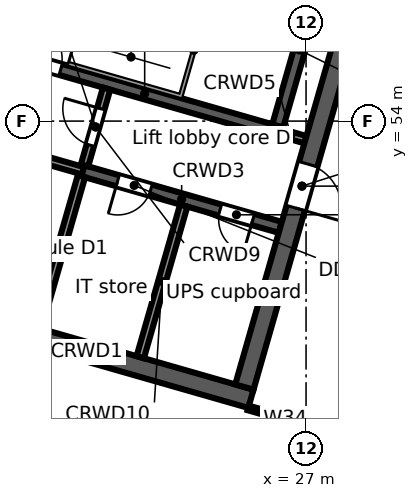
"""IFC4 building model, lengths in metres.
Left out: names, types, materials, properties, quantities, classifications, styles, units other than length and angle.
Written with IfcOpenShell. Run it as: python <this file> out.ifc"""

import sys

from ifc_helpers import new_model, si_unit, direction, frame, frame_2d, origin, place, context, subcontext, project, spatial, rectangle, extrude, element, fill, save


model = new_model("IFC4")
c1 = context("Model", 3, precision=1e-05, world=origin(), true_north=direction((0.0, 1.0)))
c2 = subcontext(c1, "Body", "Model", "MODEL_VIEW")
j1 = project(units=[si_unit("LENGTHUNIT", "METRE"), si_unit("PLANEANGLEUNIT", "RADIAN")], contexts=[c1])
p1 = place(None, origin())
s1 = spatial("IfcSite", under=j1, at=p1, CompositionType="ELEMENT")
p2 = place(p1, origin())
s2 = spatial("IfcBuilding", under=s1, at=p2, CompositionType="ELEMENT")
p3 = place(p2, frame((0.0, 0.0, 178.9)))
s3 = spatial("IfcBuildingStorey", under=s2, at=p3, CompositionType="ELEMENT", Elevation=178.9)
p4 = place(p3, frame((24.042, 41.106, 0.0), z_axis=(0.0, 0.0, 1.0), x_axis=(-0.961261693976, 0.275637362661, 0.0)))
e1 = element("IfcWall", 1, at=p4, inside=s3, PredefinedType="STANDARD", context=c2, shape_type="SweptSolid", body=[
    extrude(rectangle(XDim=24.948, YDim=0.3, at=frame_2d((12.474, 0.0))), origin(), (0.0, 0.0, 1.0), 3.68),
])
p5 = place(p4, frame((21.441, 0.0, 0.6)))
e2 = element("IfcOpeningElement", 2, at=p5, cuts=e1, PredefinedType="OPENING", context=c2, shape_type="SweptSolid", body=[
    extrude(rectangle(XDim=0.9, YDim=2.4, at=frame_2d((0.45, 1.2))), frame((0.0, 0.16, 0.0), z_axis=(0.0, -1.0, 0.0), x_axis=(1.0, 0.0, 0.0)), (0.0, 0.0, 1.0), 0.32),
])
p6 = place(p4, frame((13.121, 0.0, 0.6)))
e3 = element("IfcOpeningElement", 3, at=p6, cuts=e1, PredefinedType="OPENING", context=c2, shape_type="SweptSolid", body=[
    extrude(rectangle(XDim=0.9, YDim=2.4, at=frame_2d((0.45, 1.2))), frame((0.0, 0.16, 0.0), z_axis=(0.0, -1.0, 0.0), x_axis=(1.0, 0.0, 0.0)), (0.0, 0.0, 1.0), 0.32),
])
p7 = place(p4, frame((10.591, 0.0, 0.0)))
e4 = element("IfcOpeningElement", 4, at=p7, cuts=e1, PredefinedType="OPENING", context=c2, shape_type="SweptSolid", body=[
    extrude(rectangle(XDim=1.8, YDim=2.4, at=frame_2d((0.9, 1.2))), frame((0.0, 0.16, 0.0), z_axis=(0.0, -1.0, 0.0), x_axis=(1.0, 0.0, 0.0)), (0.0, 0.0, 1.0), 0.32),
])
p8 = place(p4, frame((4.8, 0.0, 0.6)))
e5 = element("IfcOpeningElement", 5, at=p8, cuts=e1, PredefinedType="OPENING", context=c2, shape_type="SweptSolid", body=[
    extrude(rectangle(XDim=0.9, YDim=2.4, at=frame_2d((0.45, 1.2))), frame((0.0, 0.16, 0.0), z_axis=(0.0, -1.0, 0.0), x_axis=(1.0, 0.0, 0.0)), (0.0, 0.0, 1.0), 0.32),
])
p9 = place(p4, frame((2.27, 0.0, 0.0)))
e6 = element("IfcOpeningElement", 6, at=p9, cuts=e1, PredefinedType="OPENING", context=c2, shape_type="SweptSolid", body=[
    extrude(rectangle(XDim=1.8, YDim=2.4, at=frame_2d((0.9, 1.2))), frame((0.0, 0.16, 0.0), z_axis=(0.0, -1.0, 0.0), x_axis=(1.0, 0.0, 0.0)), (0.0, 0.0, 1.0), 0.32),
])
p10 = place(p3, frame((37.399, 59.851, 0.0), z_axis=(0.0, 0.0, 1.0), x_axis=(-0.529919986982, -0.848047644532, 0.0)))
e7 = element("IfcWall", 7, at=p10, inside=s3, PredefinedType="STANDARD", context=c2, shape_type="SweptSolid", body=[
    extrude(rectangle(XDim=21.125, YDim=0.3, at=frame_2d((10.562, 0.0))), origin(), (0.0, 0.0, 1.0), 3.68),
])
p11 = place(p10, frame((16.687, 0.0, 0.6)))
e8 = element("IfcOpeningElement", 8, at=p11, cuts=e7, PredefinedType="OPENING", context=c2, shape_type="SweptSolid", body=[
    extrude(rectangle(XDim=0.9, YDim=2.4, at=frame_2d((0.45, 1.2))), frame((0.0, 0.16, 0.0), z_axis=(0.0, -1.0, 0.0), x_axis=(1.0, 0.0, 0.0)), (0.0, 0.0, 1.0), 0.32),
])
p12 = place(p10, frame((6.187, 0.0, 0.6)))
e9 = element("IfcOpeningElement", 9, at=p12, cuts=e7, PredefinedType="OPENING", context=c2, shape_type="SweptSolid", body=[
    extrude(rectangle(XDim=0.9, YDim=2.4, at=frame_2d((0.45, 1.2))), frame((0.0, 0.16, 0.0), z_axis=(0.0, -1.0, 0.0), x_axis=(1.0, 0.0, 0.0)), (0.0, 0.0, 1.0), 0.32),
])
p13 = place(p3, frame((16.897, 49.173, 0.0), z_axis=(0.0, 0.0, 1.0), x_axis=(0.96126248289, -0.275634611374, 0.0)))
e10 = element("IfcWall", 10, at=p13, inside=s3, PredefinedType="SOLIDWALL", context=c2, shape_type="SweptSolid", body=[
    extrude(rectangle(XDim=9.0, YDim=0.5, at=frame_2d((4.5, 0.0))), origin(), (0.0, 0.0, 1.0), 3.68),
])
p14 = place(p3, frame((18.632, 53.409, 0.0), z_axis=(0.0, 0.0, 1.0), x_axis=(0.961247078216, -0.275688328772, 0.0)))
e11 = element("IfcWall", 11, at=p14, inside=s3, PredefinedType="SOLIDWALL", context=c2, shape_type="SweptSolid", body=[
    extrude(rectangle(XDim=2.6, YDim=0.2, at=frame_2d((1.3, 0.0))), origin(), (0.0, 0.0, 1.0), 3.68),
])
p15 = place(p3, frame((21.131, 52.692, 0.0), z_axis=(0.0, 0.0, 1.0), x_axis=(0.961271043721, -0.27560475414, 0.0)))
e12 = element("IfcWall", 12, at=p15, inside=s3, PredefinedType="SOLIDWALL", context=c2, shape_type="SweptSolid", body=[
    extrude(rectangle(XDim=5.4, YDim=0.3, at=frame_2d((2.7, 0.0))), origin(), (0.0, 0.0, 1.0), 3.68),
])
p16 = place(p15, frame((0.95, 0.0, 0.0)))
e13 = element("IfcOpeningElement", 13, at=p16, cuts=e12, PredefinedType="OPENING", context=c2, shape_type="SweptSolid", body=[
    extrude(rectangle(XDim=0.9, YDim=2.1, at=frame_2d((0.45, 1.05))), frame((0.0, 0.16, 0.0), z_axis=(0.0, -1.0, 0.0), x_axis=(1.0, 0.0, 0.0)), (0.0, 0.0, 1.0), 0.32),
])
p17 = place(p15, frame((3.75, 0.0, 0.0)))
e14 = element("IfcOpeningElement", 14, at=p17, cuts=e12, PredefinedType="OPENING", context=c2, shape_type="SweptSolid", body=[
    extrude(rectangle(XDim=0.9, YDim=2.1, at=frame_2d((0.45, 1.05))), frame((0.0, 0.16, 0.0), z_axis=(0.0, -1.0, 0.0), x_axis=(1.0, 0.0, 0.0)), (0.0, 0.0, 1.0), 0.32),
])
p18 = place(p3, frame((19.293, 55.716, 0.0), z_axis=(0.0, 0.0, 1.0), x_axis=(0.96125862491, -0.275648065539, 0.0)))
e15 = element("IfcWall", 15, at=p18, inside=s3, PredefinedType="SOLIDWALL", context=c2, shape_type="SweptSolid", body=[
    extrude(rectangle(XDim=7.2, YDim=0.3, at=frame_2d((3.6, 0.0))), origin(), (0.0, 0.0, 1.0), 3.68),
])
p19 = place(p18, frame((0.3, 0.0, 0.0)))
e16 = element("IfcOpeningElement", 16, at=p19, cuts=e15, PredefinedType="OPENING", context=c2, shape_type="SweptSolid", body=[
    extrude(rectangle(XDim=1.0, YDim=2.1, at=frame_2d((0.5, 1.05))), frame((0.0, 0.16, 0.0), z_axis=(0.0, -1.0, 0.0), x_axis=(1.0, 0.0, 0.0)), (0.0, 0.0, 1.0), 0.32),
])
p20 = place(p3, frame((26.214, 53.732, 0.0), z_axis=(0.0, 0.0, 1.0), x_axis=(0.961200870072, -0.275849392554, 0.0)))
e17 = element("IfcWall", 17, at=p20, inside=s3, PredefinedType="SOLIDWALL", context=c2, shape_type="SweptSolid", body=[
    extrude(rectangle(XDim=0.8, YDim=0.2, at=frame_2d((0.4, 0.0))), origin(), (0.0, 0.0, 1.0), 3.68),
])
p21 = place(p3, frame((17.206, 49.344, 0.0), z_axis=(0.0, 0.0, 1.0), x_axis=(0.275632651182, 0.961263044958, 0.0)))
e18 = element("IfcWall", 18, at=p21, inside=s3, PredefinedType="SOLIDWALL", context=c2, shape_type="SweptSolid", body=[
    extrude(rectangle(XDim=11.0, YDim=0.5, at=frame_2d((5.5, 0.0))), origin(), (0.0, 0.0, 1.0), 3.68),
])
p22 = place(p21, frame((4.9, 0.0, 0.0)))
e19 = element("IfcOpeningElement", 19, at=p22, cuts=e18, PredefinedType="OPENING", context=c2, shape_type="SweptSolid", body=[
    extrude(rectangle(XDim=1.2, YDim=2.1, at=frame_2d((0.6, 1.05))), frame((0.0, 0.26, 0.0), z_axis=(0.0, -1.0, 0.0), x_axis=(1.0, 0.0, 0.0)), (0.0, 0.0, 1.0), 0.52),
])
p23 = place(p3, frame((19.946, 48.559, 0.0), z_axis=(0.0, 0.0, 1.0), x_axis=(0.275668905258, 0.961252648721, 0.0)))
e20 = element("IfcWall", 20, at=p23, inside=s3, PredefinedType="SOLIDWALL", context=c2, shape_type="SweptSolid", body=[
    extrude(rectangle(XDim=4.15, YDim=0.2, at=frame_2d((2.075, 0.0))), origin(), (0.0, 0.0, 1.0), 3.68),
])
p24 = place(p3, frame((21.172, 52.837, 0.0), z_axis=(0.0, 0.0, 1.0), x_axis=(0.275657676022, 0.961255868981, 0.0)))
e21 = element("IfcWall", 21, at=p24, inside=s3, PredefinedType="PARTITIONING", context=c2, shape_type="SweptSolid", body=[
    extrude(rectangle(XDim=2.1, YDim=0.2, at=frame_2d((1.05, 0.0))), origin(), (0.0, 0.0, 1.0), 3.68),
])
p25 = place(p24, frame((0.55, 0.0, 0.0)))
e22 = element("IfcOpeningElement", 22, at=p25, cuts=e21, PredefinedType="OPENING", context=c2, shape_type="SweptSolid", body=[
    extrude(rectangle(XDim=1.0, YDim=2.1, at=frame_2d((0.5, 1.05))), frame((0.0, 0.11, 0.0), z_axis=(0.0, -1.0, 0.0), x_axis=(1.0, 0.0, 0.0)), (0.0, 0.0, 1.0), 0.22),
])
p26 = place(p3, frame((22.637, 47.787, 0.0), z_axis=(0.0, 0.0, 1.0), x_axis=(0.275614546295, 0.961268236171, 0.0)))
e23 = element("IfcWall", 23, at=p26, inside=s3, PredefinedType="PARTITIONING", context=c2, shape_type="SweptSolid", body=[
    extrude(rectangle(XDim=4.15, YDim=0.2, at=frame_2d((2.075, 0.0))), origin(), (0.0, 0.0, 1.0), 3.68),
])
p27 = place(p3, frame((26.256, 53.876, 0.0), z_axis=(0.0, 0.0, 1.0), x_axis=(0.275614546295, 0.961268236171, 0.0)))
e24 = element("IfcWall", 24, at=p27, inside=s3, PredefinedType="SOLIDWALL", context=c2, shape_type="SweptSolid", body=[
    extrude(rectangle(XDim=4.15, YDim=0.3, at=frame_2d((2.075, 0.0))), origin(), (0.0, 0.0, 1.0), 3.68),
])
p28 = place(p3, frame((25.377, 47.002, 0.0), z_axis=(0.0, 0.0, 1.0), x_axis=(0.275632651182, 0.961263044958, 0.0)))
e25 = element("IfcWall", 25, at=p28, inside=s3, PredefinedType="SOLIDWALL", context=c2, shape_type="SweptSolid", body=[
    extrude(rectangle(XDim=11.0, YDim=0.5, at=frame_2d((5.5, 0.0))), origin(), (0.0, 0.0, 1.0), 3.68),
])
p29 = place(p28, frame((4.9, 0.0, 0.0)))
e26 = element("IfcOpeningElement", 26, at=p29, cuts=e25, PredefinedType="OPENING", context=c2, shape_type="SweptSolid", body=[
    extrude(rectangle(XDim=1.2, YDim=2.1, at=frame_2d((0.6, 1.05))), frame((0.0, 0.26, 0.0), z_axis=(0.0, -1.0, 0.0), x_axis=(1.0, 0.0, 0.0)), (0.0, 0.0, 1.0), 0.52),
])
p30 = place(p3, frame((25.479, 46.452, 0.0), z_axis=(0.0, 0.0, 1.0), x_axis=(0.961245725795, -0.275693044238, 0.0)))
e27 = element("IfcWall", 27, at=p30, inside=s3, PredefinedType="PARTITIONING", context=c2, shape_type="SweptSolid", body=[
    extrude(rectangle(XDim=2.023, YDim=0.125, at=frame_2d((1.012, 0.0))), origin(), (0.0, 0.0, 1.0), 2.952),
])
p31 = place(p19, origin())
e28 = element("IfcDoor", 28, at=p31, inside=s3, OperationType="SINGLE_SWING_LEFT", PredefinedType="DOOR", context=c2, shape_type="SweptSolid", body=[
    extrude(rectangle(XDim=1.0, YDim=2.1, at=frame_2d((0.5, 1.05))), frame((0.0, 0.025, 0.0), z_axis=(0.0, -1.0, 0.0), x_axis=(1.0, 0.0, 0.0)), (0.0, 0.0, 1.0), 0.05),
])
fill(e16, e28)
p32 = place(p25, origin())
e29 = element("IfcDoor", 29, at=p32, inside=s3, OperationType="SINGLE_SWING_RIGHT", PredefinedType="DOOR", context=c2, shape_type="SweptSolid", body=[
    extrude(rectangle(XDim=1.0, YDim=2.1, at=frame_2d((0.5, 1.05))), frame((0.0, 0.025, 0.0), z_axis=(0.0, -1.0, 0.0), x_axis=(1.0, 0.0, 0.0)), (0.0, 0.0, 1.0), 0.05),
])
fill(e22, e29)
p33 = place(p29, frame((1.2, 0.0, 0.0), z_axis=(0.0, 0.0, 1.0), x_axis=(-1.0, 0.0, 0.0)))
e30 = element("IfcDoor", 30, at=p33, inside=s3, OperationType="SINGLE_SWING_RIGHT", PredefinedType="DOOR", context=c2, shape_type="SweptSolid", body=[
    extrude(rectangle(XDim=1.2, YDim=2.1, at=frame_2d((0.6, 1.05))), frame((0.0, 0.025, 0.0), z_axis=(0.0, -1.0, 0.0), x_axis=(1.0, 0.0, 0.0)), (0.0, 0.0, 1.0), 0.05),
])
fill(e26, e30)
p34 = place(p16, frame((0.9, 0.0, 0.0), z_axis=(0.0, 0.0, 1.0), x_axis=(-1.0, 0.0, 0.0)))
e31 = element("IfcDoor", 31, at=p34, inside=s3, OperationType="SINGLE_SWING_RIGHT", PredefinedType="DOOR", context=c2, shape_type="SweptSolid", body=[
    extrude(rectangle(XDim=0.9, YDim=2.1, at=frame_2d((0.45, 1.05))), frame((0.0, 0.025, 0.0), z_axis=(0.0, -1.0, 0.0), x_axis=(1.0, 0.0, 0.0)), (0.0, 0.0, 1.0), 0.05),
])
fill(e13, e31)
p35 = place(p17, frame((0.9, 0.0, 0.0), z_axis=(0.0, 0.0, 1.0), x_axis=(-1.0, 0.0, 0.0)))
e32 = element("IfcDoor", 32, at=p35, inside=s3, OperationType="SINGLE_SWING_LEFT", PredefinedType="DOOR", context=c2, shape_type="SweptSolid", body=[
    extrude(rectangle(XDim=0.9, YDim=2.1, at=frame_2d((0.45, 1.05))), frame((0.0, 0.025, 0.0), z_axis=(0.0, -1.0, 0.0), x_axis=(1.0, 0.0, 0.0)), (0.0, 0.0, 1.0), 0.05),
])
fill(e14, e32)
save(model, sys.argv[1])
